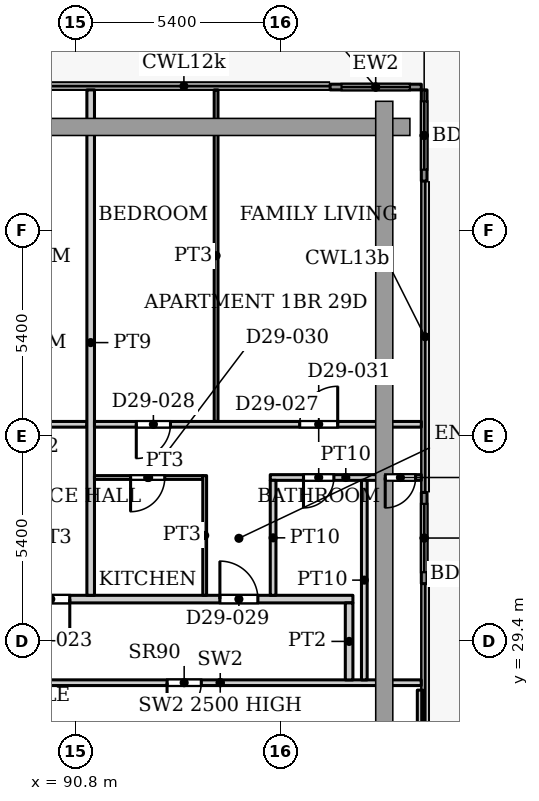
"""IFC4 building model, lengths in metres.
Left out: names, types, materials, properties, quantities, classifications, styles, units other than length and angle.
Written with IfcOpenShell. Run it as: python <this file> out.ifc"""

import sys

from ifc_helpers import new_model, si_unit, direction, frame, frame_2d, origin, place, context, subcontext, project, spatial, rectangle, extrude, source, transform, mapped, element, fill, save


model = new_model("IFC4")
c1 = context("Model", 3, precision=1e-05, world=origin(), true_north=direction((0.0, 1.0)))
c2 = subcontext(c1, "Body", "Model", "MODEL_VIEW")
j1 = project(units=[si_unit("LENGTHUNIT", "METRE"), si_unit("PLANEANGLEUNIT", "RADIAN")], contexts=[c1])
p1 = place(None, origin())
s1 = spatial("IfcSite", under=j1, at=p1, CompositionType="ELEMENT")
p2 = place(p1, origin())
s2 = spatial("IfcBuilding", under=s1, at=p2, CompositionType="ELEMENT")
p3 = place(p2, frame((0.0, 0.0, 125.3)))
s3 = spatial("IfcBuildingStorey", under=s2, at=p3, CompositionType="ELEMENT", Elevation=125.3)
p4 = place(p3, frame((97.5, 43.975, 0.0), z_axis=(0.0, 0.0, 1.0), x_axis=(1.0, 0.0, 0.0)))
e1 = element("IfcWall", 1, at=p4, inside=s3, PredefinedType="SOLIDWALL", context=c2, shape_type="SweptSolid", body=[
    extrude(rectangle(XDim=2.4, YDim=0.15, at=frame_2d((1.2, 0.0))), origin(), (0.0, 0.0, 1.0), 3.75),
])
p5 = place(p4, frame((0.3, 0.0, 0.0)))
e2 = element("IfcOpeningElement", 2, at=p5, cuts=e1, PredefinedType="OPENING", context=c2, shape_type="SweptSolid", body=[
    extrude(rectangle(XDim=1.8, YDim=2.4, at=frame_2d((0.9, 1.2))), frame((0.0, 0.085, 0.0), z_axis=(0.0, -1.0, 0.0), x_axis=(1.0, 0.0, 0.0)), (0.0, 0.0, 1.0), 0.17),
])
p6 = place(p3, frame((99.975, 43.9, 0.0), z_axis=(0.0, 0.0, 1.0), x_axis=(0.0, -1.0, 0.0)))
e3 = element("IfcWall", 3, at=p6, inside=s3, PredefinedType="SOLIDWALL", context=c2, shape_type="SweptSolid", body=[
    extrude(rectangle(XDim=2.4, YDim=0.15, at=frame_2d((1.2, 0.0))), origin(), (0.0, 0.0, 1.0), 3.75),
])
p7 = place(p6, frame((0.3, 0.0, 0.0)))
e4 = element("IfcOpeningElement", 4, at=p7, cuts=e3, PredefinedType="OPENING", context=c2, shape_type="SweptSolid", body=[
    extrude(rectangle(XDim=1.8, YDim=2.4, at=frame_2d((0.9, 1.2))), frame((0.0, 0.085, 0.0), z_axis=(0.0, -1.0, 0.0), x_axis=(1.0, 0.0, 0.0)), (0.0, 0.0, 1.0), 0.17),
])
p8 = place(p3, frame((99.975, 33.307, 0.0), z_axis=(0.0, 0.0, 1.0), x_axis=(0.0, -1.0, 0.0)))
e5 = element("IfcWall", 5, at=p8, inside=s3, PredefinedType="SOLIDWALL", context=c2, shape_type="SweptSolid", body=[
    extrude(rectangle(XDim=2.4, YDim=0.15, at=frame_2d((1.2, 0.0))), origin(), (0.0, 0.0, 1.0), 3.75),
])
p9 = place(p8, frame((0.3, 0.0, 0.0)))
e6 = element("IfcOpeningElement", 6, at=p9, cuts=e5, PredefinedType="OPENING", context=c2, shape_type="SweptSolid", body=[
    extrude(rectangle(XDim=1.8, YDim=2.4, at=frame_2d((0.9, 1.2))), frame((0.0, 0.085, 0.0), z_axis=(0.0, -1.0, 0.0), x_axis=(1.0, 0.0, 0.0)), (0.0, 0.0, 1.0), 0.17),
])
p10 = place(p3, frame((89.32, 28.3, 0.0), z_axis=(0.0, 0.0, 1.0), x_axis=(1.0, 0.0, 0.0)))
e7 = element("IfcWall", 7, at=p10, inside=s3, PredefinedType="PARTITIONING", context=c2, shape_type="SweptSolid", body=[
    extrude(rectangle(XDim=10.578, YDim=0.15, at=frame_2d((5.289, 0.0))), origin(), (0.0, 0.0, 1.0), 2.5),
])
p11 = place(p10, frame((3.89, 0.0, 0.0)))
e8 = element("IfcOpeningElement", 8, at=p11, cuts=e7, PredefinedType="OPENING", context=c2, shape_type="SweptSolid", body=[
    extrude(rectangle(XDim=0.9, YDim=2.2, at=frame_2d((0.45, 1.1))), frame((0.0, 0.085, 0.0), z_axis=(0.0, -1.0, 0.0), x_axis=(1.0, 0.0, 0.0)), (0.0, 0.0, 1.0), 0.17),
])
p12 = place(p3, frame((99.87, 21.015, 0.0), z_axis=(0.0, 0.0, 1.0), x_axis=(0.0, 1.0, 0.0)))
e9 = element("IfcWall", 9, at=p12, inside=s3, PredefinedType="PARTITIONING", context=c2, shape_type="SweptSolid", body=[
    extrude(rectangle(XDim=7.09, YDim=0.15, at=frame_2d((3.545, 0.0))), origin(), (0.0, 0.0, 1.0), 3.9),
])
p13 = place(p3, frame((55.9, 30.5, 0.0), z_axis=(0.0, 0.0, 1.0), x_axis=(1.0, 0.0, 0.0)))
e10 = element("IfcWall", 10, at=p13, inside=s3, PredefinedType="PARTITIONING", context=c2, shape_type="SweptSolid", body=[
    extrude(rectangle(XDim=42.2, YDim=0.2, at=frame_2d((21.1, 0.0))), origin(), (0.0, 0.0, 1.0), 3.6),
])
p14 = place(p13, frame((0.45, 0.0, 0.0)))
e11 = element("IfcOpeningElement", 11, at=p14, cuts=e10, PredefinedType="OPENING", context=c2, shape_type="SweptSolid", body=[
    extrude(rectangle(XDim=1.0, YDim=2.1, at=frame_2d((0.5, 1.05))), frame((0.0, 0.11, 0.0), z_axis=(0.0, -1.0, 0.0), x_axis=(1.0, 0.0, 0.0)), (0.0, 0.0, 1.0), 0.22),
])
p15 = place(p13, frame((20.1, 0.0, 0.0)))
e12 = element("IfcOpeningElement", 12, at=p15, cuts=e10, PredefinedType="OPENING", context=c2, shape_type="SweptSolid", body=[
    extrude(rectangle(XDim=1.0, YDim=2.1, at=frame_2d((0.5, 1.05))), frame((0.0, 0.11, 0.0), z_axis=(0.0, -1.0, 0.0), x_axis=(1.0, 0.0, 0.0)), (0.0, 0.0, 1.0), 0.22),
])
p16 = place(p13, frame((33.75, 0.0, 0.0)))
e13 = element("IfcOpeningElement", 13, at=p16, cuts=e10, PredefinedType="OPENING", context=c2, shape_type="SweptSolid", body=[
    extrude(rectangle(XDim=1.0, YDim=2.1, at=frame_2d((0.5, 1.05))), frame((0.0, 0.11, 0.0), z_axis=(0.0, -1.0, 0.0), x_axis=(1.0, 0.0, 0.0)), (0.0, 0.0, 1.0), 0.22),
])
p17 = place(p13, frame((38.7, 0.0, 0.0)))
e14 = element("IfcOpeningElement", 14, at=p17, cuts=e10, PredefinedType="OPENING", context=c2, shape_type="SweptSolid", body=[
    extrude(rectangle(XDim=1.0, YDim=2.1, at=frame_2d((0.5, 1.05))), frame((0.0, 0.11, 0.0), z_axis=(0.0, -1.0, 0.0), x_axis=(1.0, 0.0, 0.0)), (0.0, 0.0, 1.0), 0.22),
])
p18 = place(p3, frame((81.7, 35.1, 0.0), z_axis=(0.0, 0.0, 1.0), x_axis=(1.0, 0.0, 0.0)))
e15 = element("IfcWall", 15, at=p18, inside=s3, PredefinedType="PARTITIONING", context=c2, shape_type="SweptSolid", body=[
    extrude(rectangle(XDim=9.4, YDim=0.15, at=frame_2d((4.7, 0.0))), origin(), (0.0, 0.0, 1.0), 3.6),
])
p19 = place(p18, frame((7.1, 0.0, 0.0)))
e16 = element("IfcOpeningElement", 16, at=p19, cuts=e15, PredefinedType="OPENING", context=c2, shape_type="SweptSolid", body=[
    extrude(rectangle(XDim=0.9, YDim=2.1, at=frame_2d((0.45, 1.05))), frame((0.0, 0.085, 0.0), z_axis=(0.0, -1.0, 0.0), x_axis=(1.0, 0.0, 0.0)), (0.0, 0.0, 1.0), 0.17),
])
p20 = place(p18, frame((2.25, 0.0, 0.0)))
e17 = element("IfcOpeningElement", 17, at=p20, cuts=e15, PredefinedType="OPENING", context=c2, shape_type="SweptSolid", body=[
    extrude(rectangle(XDim=1.0, YDim=2.1, at=frame_2d((0.5, 1.05))), frame((0.0, 0.085, 0.0), z_axis=(0.0, -1.0, 0.0), x_axis=(1.0, 0.0, 0.0)), (0.0, 0.0, 1.0), 0.17),
])
p21 = place(p3, frame((91.2, 30.6, 0.0), z_axis=(0.0, 0.0, 1.0), x_axis=(0.0, 1.0, 0.0)))
e18 = element("IfcWall", 18, at=p21, inside=s3, PredefinedType="PARTITIONING", context=c2, shape_type="SweptSolid", body=[
    extrude(rectangle(XDim=13.3, YDim=0.2, at=frame_2d((6.65, 0.0))), origin(), (0.0, 0.0, 1.0), 3.6),
])
p22 = place(p3, frame((91.3, 33.7, 0.0), z_axis=(0.0, 0.0, 1.0), x_axis=(1.0, 0.0, 0.0)))
e19 = element("IfcWall", 19, at=p22, inside=s3, PredefinedType="PARTITIONING", context=c2, shape_type="SweptSolid", body=[
    extrude(rectangle(XDim=2.85, YDim=0.1, at=frame_2d((1.425, 0.0))), origin(), (0.0, 0.0, 1.0), 3.6),
])
p23 = place(p22, frame((0.95, 0.0, 0.0)))
e20 = element("IfcOpeningElement", 20, at=p23, cuts=e19, PredefinedType="OPENING", context=c2, shape_type="SweptSolid", body=[
    extrude(rectangle(XDim=0.9, YDim=2.1, at=frame_2d((0.45, 1.05))), frame((0.0, 0.06, 0.0), z_axis=(0.0, -1.0, 0.0), x_axis=(1.0, 0.0, 0.0)), (0.0, 0.0, 1.0), 0.12),
])
p24 = place(p3, frame((91.3, 35.1, 0.0), z_axis=(0.0, 0.0, 1.0), x_axis=(1.0, 0.0, 0.0)))
e21 = element("IfcWall", 21, at=p24, inside=s3, PredefinedType="PARTITIONING", context=c2, shape_type="SweptSolid", body=[
    extrude(rectangle(XDim=8.6, YDim=0.15, at=frame_2d((4.3, 0.0))), origin(), (0.0, 0.0, 1.0), 3.6),
])
p25 = place(p24, frame((1.1, 0.0, 0.0)))
e22 = element("IfcOpeningElement", 22, at=p25, cuts=e21, PredefinedType="OPENING", context=c2, shape_type="SweptSolid", body=[
    extrude(rectangle(XDim=0.9, YDim=2.1, at=frame_2d((0.45, 1.05))), frame((0.0, 0.085, 0.0), z_axis=(0.0, -1.0, 0.0), x_axis=(1.0, 0.0, 0.0)), (0.0, 0.0, 1.0), 0.17),
])
p26 = place(p24, frame((5.4, 0.0, 0.0)))
e23 = element("IfcOpeningElement", 23, at=p26, cuts=e21, PredefinedType="OPENING", context=c2, shape_type="SweptSolid", body=[
    extrude(rectangle(XDim=1.0, YDim=2.1, at=frame_2d((0.5, 1.05))), frame((0.0, 0.085, 0.0), z_axis=(0.0, -1.0, 0.0), x_axis=(1.0, 0.0, 0.0)), (0.0, 0.0, 1.0), 0.17),
])
p27 = place(p3, frame((94.2, 30.6, 0.0), z_axis=(0.0, 0.0, 1.0), x_axis=(0.0, 1.0, 0.0)))
e24 = element("IfcWall", 24, at=p27, inside=s3, PredefinedType="PARTITIONING", context=c2, shape_type="SweptSolid", body=[
    extrude(rectangle(XDim=3.15, YDim=0.1, at=frame_2d((1.575, 0.0))), origin(), (0.0, 0.0, 1.0), 3.6),
])
p28 = place(p3, frame((94.5, 35.175, 0.0), z_axis=(0.0, 0.0, 1.0), x_axis=(0.0, 1.0, 0.0)))
e25 = element("IfcWall", 25, at=p28, inside=s3, PredefinedType="PARTITIONING", context=c2, shape_type="SweptSolid", body=[
    extrude(rectangle(XDim=8.725, YDim=0.1, at=frame_2d((4.362, 0.0))), origin(), (0.0, 0.0, 1.0), 3.6),
])
p29 = place(p3, frame((95.925, 33.7, 0.0), z_axis=(0.0, 0.0, 1.0), x_axis=(1.0, 0.0, 0.0)))
e26 = element("IfcWall", 26, at=p29, inside=s3, PredefinedType="PARTITIONING", context=c2, shape_type="SweptSolid", body=[
    extrude(rectangle(XDim=3.975, YDim=0.15, at=frame_2d((1.987, 0.0))), origin(), (0.0, 0.0, 1.0), 3.6),
])
p30 = place(p29, frame((0.875, 0.0, 0.0)))
e27 = element("IfcOpeningElement", 27, at=p30, cuts=e26, PredefinedType="OPENING", context=c2, shape_type="SweptSolid", body=[
    extrude(rectangle(XDim=0.8, YDim=2.1, at=frame_2d((0.4, 1.05))), frame((0.0, 0.085, 0.0), z_axis=(0.0, -1.0, 0.0), x_axis=(1.0, 0.0, 0.0)), (0.0, 0.0, 1.0), 0.17),
])
p31 = place(p29, frame((3.025, 0.0, 0.0)))
e28 = element("IfcOpeningElement", 28, at=p31, cuts=e26, PredefinedType="OPENING", context=c2, shape_type="SweptSolid", body=[
    extrude(rectangle(XDim=0.8, YDim=2.1, at=frame_2d((0.4, 1.05))), frame((0.0, 0.085, 0.0), z_axis=(0.0, -1.0, 0.0), x_axis=(1.0, 0.0, 0.0)), (0.0, 0.0, 1.0), 0.17),
])
p32 = place(p3, frame((96.0, 30.6, 0.0), z_axis=(0.0, 0.0, 1.0), x_axis=(0.0, 1.0, 0.0)))
e29 = element("IfcWall", 29, at=p32, inside=s3, PredefinedType="PARTITIONING", context=c2, shape_type="SweptSolid", body=[
    extrude(rectangle(XDim=3.025, YDim=0.15, at=frame_2d((1.512, 0.0))), origin(), (0.0, 0.0, 1.0), 3.6),
])
p33 = place(p3, frame((98.0, 28.374, 0.0), z_axis=(0.0, 0.0, 1.0), x_axis=(0.0, 1.0, 0.0)))
e30 = element("IfcWall", 30, at=p33, inside=s3, PredefinedType="PARTITIONING", context=c2, shape_type="SweptSolid", body=[
    extrude(rectangle(XDim=2.026, YDim=0.2, at=frame_2d((1.013, 0.0))), origin(), (0.0, 0.0, 1.0), 3.6),
])
p34 = place(p3, frame((98.4, 28.374, 0.0), z_axis=(0.0, 0.0, 1.0), x_axis=(0.0, 1.0, 0.0)))
e31 = element("IfcWall", 31, at=p34, inside=s3, PredefinedType="PARTITIONING", context=c2, shape_type="SweptSolid", body=[
    extrude(rectangle(XDim=5.251, YDim=0.15, at=frame_2d((2.625, 0.0))), origin(), (0.0, 0.0, 1.0), 3.6),
])
m1 = source(origin(), c2, "Body", "SweptSolid", [
    extrude(rectangle(XDim=1.8, YDim=2.4, at=frame_2d((0.9, 1.2))), frame((0.0, 0.025, 0.0), z_axis=(0.0, -1.0, 0.0), x_axis=(1.0, 0.0, 0.0)), (0.0, 0.0, 1.0), 0.05),
])
p35 = place(p5, origin())
e32 = element("IfcDoor", 32, at=p35, inside=s3, OperationType="SLIDING_TO_LEFT", PredefinedType="DOOR", context=c2, shape_type="MappedRepresentation", body=[
    mapped(m1, transform((0.0, 0.0, 0.0), x_axis=(1.0, 0.0, 0.0), y_axis=(0.0, 1.0, 0.0), z_axis=(0.0, 0.0, 1.0), scale=1.0)),
])
fill(e2, e32)
p36 = place(p7, origin())
e33 = element("IfcDoor", 33, at=p36, inside=s3, OperationType="SLIDING_TO_LEFT", PredefinedType="DOOR", context=c2, shape_type="MappedRepresentation", body=[
    mapped(m1, transform((0.0, 0.0, 0.0), x_axis=(1.0, 0.0, 0.0), y_axis=(0.0, 1.0, 0.0), z_axis=(0.0, 0.0, 1.0), scale=1.0)),
])
fill(e4, e33)
p37 = place(p9, origin())
e34 = element("IfcDoor", 34, at=p37, inside=s3, OperationType="SLIDING_TO_LEFT", PredefinedType="DOOR", context=c2, shape_type="MappedRepresentation", body=[
    mapped(m1, transform((0.0, 0.0, 0.0), x_axis=(1.0, 0.0, 0.0), y_axis=(0.0, 1.0, 0.0), z_axis=(0.0, 0.0, 1.0), scale=1.0)),
])
fill(e6, e34)
m2 = source(origin(), c2, "Body", "SweptSolid", [
    extrude(rectangle(XDim=0.9, YDim=2.2, at=frame_2d((0.45, 1.1))), frame((0.0, 0.025, 0.0), z_axis=(0.0, -1.0, 0.0), x_axis=(1.0, 0.0, 0.0)), (0.0, 0.0, 1.0), 0.05),
])
p38 = place(p11, origin())
e35 = element("IfcDoor", 35, at=p38, inside=s3, OperationType="SINGLE_SWING_RIGHT", PredefinedType="DOOR", context=c2, shape_type="MappedRepresentation", body=[
    mapped(m2, transform((0.0, 0.0, 0.0), x_axis=(1.0, 0.0, 0.0), y_axis=(0.0, 1.0, 0.0), z_axis=(0.0, 0.0, 1.0), scale=1.0)),
])
fill(e8, e35)
m3 = source(origin(), c2, "Body", "SweptSolid", [
    extrude(rectangle(XDim=1.0, YDim=2.1, at=frame_2d((0.5, 1.05))), frame((0.0, 0.025, 0.0), z_axis=(0.0, -1.0, 0.0), x_axis=(1.0, 0.0, 0.0)), (0.0, 0.0, 1.0), 0.05),
])
p39 = place(p16, origin())
e36 = element("IfcDoor", 36, at=p39, inside=s3, OperationType="SINGLE_SWING_RIGHT", PredefinedType="DOOR", context=c2, shape_type="MappedRepresentation", body=[
    mapped(m3, transform((0.0, 0.0, 0.0), x_axis=(1.0, 0.0, 0.0), y_axis=(0.0, 1.0, 0.0), z_axis=(0.0, 0.0, 1.0), scale=1.0)),
])
fill(e13, e36)
m4 = source(origin(), c2, "Body", "SweptSolid", [
    extrude(rectangle(XDim=0.8, YDim=2.1, at=frame_2d((0.4, 1.05))), frame((0.0, 0.025, 0.0), z_axis=(0.0, -1.0, 0.0), x_axis=(1.0, 0.0, 0.0)), (0.0, 0.0, 1.0), 0.05),
])
p40 = place(p30, origin())
e37 = element("IfcDoor", 37, at=p40, inside=s3, OperationType="SINGLE_SWING_RIGHT", PredefinedType="DOOR", context=c2, shape_type="MappedRepresentation", body=[
    mapped(m4, transform((0.0, 0.0, 0.0), x_axis=(1.0, 0.0, 0.0), y_axis=(0.0, 1.0, 0.0), z_axis=(0.0, 0.0, 1.0), scale=1.0)),
])
fill(e27, e37)
m5 = source(origin(), c2, "Body", "SweptSolid", [
    extrude(rectangle(XDim=0.9, YDim=2.1, at=frame_2d((0.45, 1.05))), frame((0.0, 0.025, 0.0), z_axis=(0.0, -1.0, 0.0), x_axis=(1.0, 0.0, 0.0)), (0.0, 0.0, 1.0), 0.05),
])
p41 = place(p25, origin())
e38 = element("IfcDoor", 38, at=p41, inside=s3, OperationType="SINGLE_SWING_RIGHT", PredefinedType="DOOR", context=c2, shape_type="MappedRepresentation", body=[
    mapped(m5, transform((0.0, 0.0, 0.0), x_axis=(1.0, 0.0, 0.0), y_axis=(0.0, 1.0, 0.0), z_axis=(0.0, 0.0, 1.0), scale=1.0)),
])
fill(e22, e38)
p42 = place(p17, origin())
e39 = element("IfcDoor", 39, at=p42, inside=s3, OperationType="SINGLE_SWING_LEFT", PredefinedType="DOOR", context=c2, shape_type="MappedRepresentation", body=[
    mapped(m3, transform((0.0, 0.0, 0.0), x_axis=(1.0, 0.0, 0.0), y_axis=(0.0, 1.0, 0.0), z_axis=(0.0, 0.0, 1.0), scale=1.0)),
])
fill(e14, e39)
p43 = place(p23, origin())
e40 = element("IfcDoor", 40, at=p43, inside=s3, OperationType="SINGLE_SWING_RIGHT", PredefinedType="DOOR", context=c2, shape_type="MappedRepresentation", body=[
    mapped(m5, transform((0.0, 0.0, 0.0), x_axis=(1.0, 0.0, 0.0), y_axis=(0.0, 1.0, 0.0), z_axis=(0.0, 0.0, 1.0), scale=1.0)),
])
fill(e20, e40)
m6 = source(origin(), c2, "Body", "SweptSolid", [
    extrude(rectangle(XDim=1.0, YDim=2.1, at=frame_2d((0.5, 1.05))), frame((0.0, 0.025, 0.0), z_axis=(0.0, -1.0, 0.0), x_axis=(1.0, 0.0, 0.0)), (0.0, 0.0, 1.0), 0.05),
])
p44 = place(p26, origin())
e41 = element("IfcDoor", 41, at=p44, inside=s3, OperationType="SINGLE_SWING_LEFT", PredefinedType="DOOR", context=c2, shape_type="MappedRepresentation", body=[
    mapped(m6, transform((0.0, 0.0, 0.0), x_axis=(1.0, 0.0, 0.0), y_axis=(0.0, 1.0, 0.0), z_axis=(0.0, 0.0, 1.0), scale=1.0)),
])
fill(e23, e41)
p45 = place(p31, origin())
e42 = element("IfcDoor", 42, at=p45, inside=s3, OperationType="SINGLE_SWING_RIGHT", PredefinedType="DOOR", context=c2, shape_type="MappedRepresentation", body=[
    mapped(m4, transform((0.0, 0.0, 0.0), x_axis=(1.0, 0.0, 0.0), y_axis=(0.0, 1.0, 0.0), z_axis=(0.0, 0.0, 1.0), scale=1.0)),
])
fill(e28, e42)
save(model, sys.argv[1])
